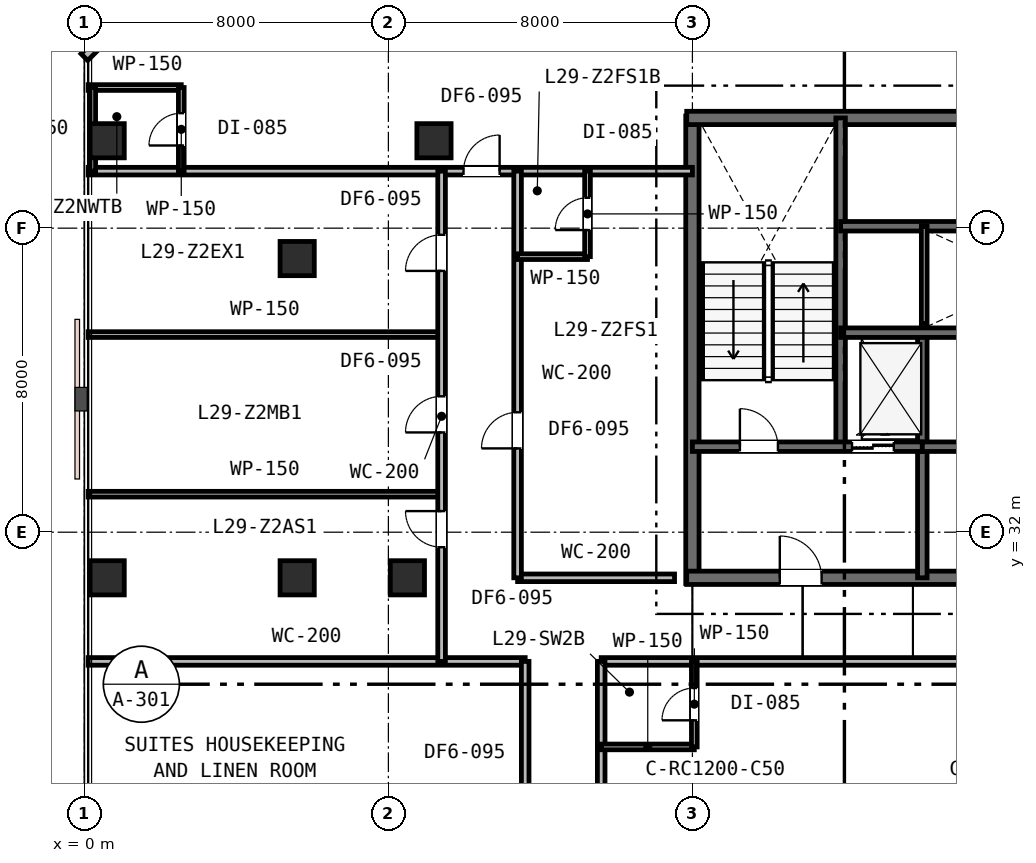
"""IFC4 building model, lengths in metres.
Left out: names, types, materials, properties, quantities, classifications, styles, units other than length and angle.
Written with IfcOpenShell. Run it as: python <this file> out.ifc"""

import sys

from ifc_helpers import new_model, si_unit, direction, frame, frame_2d, origin, origin_2d, place, context, subcontext, project, spatial, rectangle, extrude, element, fill, save


model = new_model("IFC4")
c1 = context("Model", 3, precision=1e-05, world=origin(), true_north=direction((0.0, 1.0)))
c2 = subcontext(c1, "Body", "Model", "MODEL_VIEW")
j1 = project(units=[si_unit("LENGTHUNIT", "METRE"), si_unit("PLANEANGLEUNIT", "RADIAN")], contexts=[c1])
p1 = place(None, origin())
s1 = spatial("IfcSite", under=j1, at=p1, CompositionType="ELEMENT")
p2 = place(p1, origin())
s2 = spatial("IfcBuilding", under=s1, at=p2, CompositionType="ELEMENT")
p3 = place(p2, frame((0.0, 0.0, 115.2)))
s3 = spatial("IfcBuildingStorey", under=s2, at=p3, CompositionType="ELEMENT", Elevation=115.2)
p4 = place(p3, frame((16.0, 30.65, 0.0), z_axis=(0.0, 0.0, 1.0), x_axis=(0.0, 1.0, 0.0)))
e1 = element("IfcWall", 1, at=p4, inside=s3, PredefinedType="SHEAR", context=c2, shape_type="SweptSolid", body=[
    extrude(rectangle(XDim=12.3, YDim=0.35, at=frame_2d((6.15, 0.0))), origin(), (0.0, 0.0, 1.0), 3.6),
])
p5 = place(p3, frame((15.85, 42.9, 0.0), z_axis=(0.0, 0.0, 1.0), x_axis=(1.0, 0.0, 0.0)))
e2 = element("IfcWall", 2, at=p5, inside=s3, PredefinedType="SHEAR", context=c2, shape_type="SweptSolid", body=[
    extrude(rectangle(XDim=24.3, YDim=0.35, at=frame_2d((12.15, 0.0))), origin(), (0.0, 0.0, 1.0), 3.6),
])
p6 = place(p3, frame((15.85, 30.8, 0.0), z_axis=(0.0, 0.0, 1.0), x_axis=(1.0, 0.0, 0.0)))
e3 = element("IfcWall", 3, at=p6, inside=s3, PredefinedType="SHEAR", context=c2, shape_type="SweptSolid", body=[
    extrude(rectangle(XDim=11.2, YDim=0.35, at=frame_2d((5.6, 0.0))), origin(), (0.0, 0.0, 1.0), 3.6),
])
p7 = place(p6, frame((2.45, 0.0, 0.0)))
e4 = element("IfcOpeningElement", 4, at=p7, cuts=e3, PredefinedType="OPENING", context=c2, shape_type="SweptSolid", body=[
    extrude(rectangle(XDim=1.1, YDim=2.15, at=frame_2d((0.55, 1.075))), frame((0.0, 0.185, 0.0), z_axis=(0.0, -1.0, 0.0), x_axis=(1.0, 0.0, 0.0)), (0.0, 0.0, 1.0), 0.37),
])
p8 = place(p3, frame((19.9, 34.25, 0.0), z_axis=(0.0, 0.0, 1.0), x_axis=(0.0, 1.0, 0.0)))
e5 = element("IfcWall", 5, at=p8, inside=s3, PredefinedType="SHEAR", context=c2, shape_type="SweptSolid", body=[
    extrude(rectangle(XDim=8.65, YDim=0.25, at=frame_2d((4.325, 0.0))), origin(), (0.0, 0.0, 1.0), 3.6),
])
p9 = place(p3, frame((22.05, 30.8, 0.0), z_axis=(0.0, 0.0, 1.0), x_axis=(0.0, 1.0, 0.0)))
e6 = element("IfcWall", 6, at=p9, inside=s3, PredefinedType="SHEAR", context=c2, shape_type="SweptSolid", body=[
    extrude(rectangle(XDim=6.45, YDim=0.25, at=frame_2d((3.225, 0.0))), origin(), (0.0, 0.0, 1.0), 3.6),
])
p10 = place(p3, frame((16.0, 34.25, 0.0), z_axis=(0.0, 0.0, 1.0), x_axis=(1.0, 0.0, 0.0)))
e7 = element("IfcWall", 7, at=p10, inside=s3, PredefinedType="SHEAR", context=c2, shape_type="SweptSolid", body=[
    extrude(rectangle(XDim=6.05, YDim=0.25, at=frame_2d((3.025, 0.0))), origin(), (0.0, 0.0, 1.0), 3.6),
])
p11 = place(p10, frame((1.25, 0.0, 0.0)))
e8 = element("IfcOpeningElement", 8, at=p11, cuts=e7, PredefinedType="OPENING", context=c2, shape_type="SweptSolid", body=[
    extrude(rectangle(XDim=1.0, YDim=2.15, at=frame_2d((0.5, 1.075))), frame((0.0, 0.135, 0.0), z_axis=(0.0, -1.0, 0.0), x_axis=(1.0, 0.0, 0.0)), (0.0, 0.0, 1.0), 0.27),
])
p12 = place(p10, frame((4.2, 0.0, 0.0)))
e9 = element("IfcOpeningElement", 9, at=p12, cuts=e7, PredefinedType="OPENING", context=c2, shape_type="SweptSolid", body=[
    extrude(rectangle(XDim=1.1, YDim=2.15, at=frame_2d((0.55, 1.075))), frame((0.0, 0.135, 0.0), z_axis=(0.0, -1.0, 0.0), x_axis=(1.0, 0.0, 0.0)), (0.0, 0.0, 1.0), 0.27),
])
p13 = place(p3, frame((22.05, 34.25, 0.0), z_axis=(0.0, 0.0, 1.0), x_axis=(1.0, 0.0, 0.0)))
e10 = element("IfcWall", 10, at=p13, inside=s3, PredefinedType="SHEAR", context=c2, shape_type="SweptSolid", body=[
    extrude(rectangle(XDim=5.0, YDim=0.25, at=frame_2d((2.5, 0.0))), origin(), (0.0, 0.0, 1.0), 3.6),
])
p14 = place(p13, frame((1.95, 0.0, 0.0)))
e11 = element("IfcOpeningElement", 11, at=p14, cuts=e10, PredefinedType="OPENING", context=c2, shape_type="SweptSolid", body=[
    extrude(rectangle(XDim=1.0, YDim=2.15, at=frame_2d((0.5, 1.075))), frame((0.0, 0.135, 0.0), z_axis=(0.0, -1.0, 0.0), x_axis=(1.0, 0.0, 0.0)), (0.0, 0.0, 1.0), 0.27),
])
p15 = place(p3, frame((19.9, 37.25, 0.0), z_axis=(0.0, 0.0, 1.0), x_axis=(1.0, 0.0, 0.0)))
e12 = element("IfcWall", 12, at=p15, inside=s3, PredefinedType="SHEAR", context=c2, shape_type="SweptSolid", body=[
    extrude(rectangle(XDim=16.2, YDim=0.25, at=frame_2d((8.1, 0.0))), origin(), (0.0, 0.0, 1.0), 3.6),
])
p16 = place(p15, frame((12.55, 0.0, 0.0)))
e13 = element("IfcOpeningElement", 13, at=p16, cuts=e12, PredefinedType="OPENING", context=c2, shape_type="SweptSolid", body=[
    extrude(rectangle(XDim=0.9, YDim=2.15, at=frame_2d((0.45, 1.075))), frame((0.0, 0.135, 0.0), z_axis=(0.0, -1.0, 0.0), x_axis=(1.0, 0.0, 0.0)), (0.0, 0.0, 1.0), 0.27),
])
p17 = place(p3, frame((19.9, 40.05, 0.0), z_axis=(0.0, 0.0, 1.0), x_axis=(1.0, 0.0, 0.0)))
e14 = element("IfcWall", 14, at=p17, inside=s3, PredefinedType="SHEAR", context=c2, shape_type="SweptSolid", body=[
    extrude(rectangle(XDim=12.05, YDim=0.25, at=frame_2d((6.025, 0.0))), origin(), (0.0, 0.0, 1.0), 3.6),
])
for number, where, z_axis, x_axis in (
    (15, (5.6, 30.8, 0.0), (0.0, 0.0, 1.0), (1.0, 0.0, 0.0)),
    (16, (5.6, 39.2, 0.0), (0.0, 0.0, 1.0), (1.0, 0.0, 0.0)),
    (17, (8.5, 30.8, 0.0), (0.0, 0.0, 1.0), (1.0, 0.0, 0.0)),
    (18, (9.2, 42.3, 0.0), (0.0, 0.0, 1.0), (1.0, 0.0, 0.0)),
    (19, (0.6, 30.8, 0.0), (0.0, 0.0, 1.0), (1.0, 0.0, 0.0)),
    (20, (0.6, 42.3, 0.0), (0.0, 0.0, 1.0), (1.0, 0.0, 0.0)),
):
    element("IfcColumn", number, at=place(p3, frame(where, z_axis=z_axis, x_axis=x_axis)), inside=s3, PredefinedType="COLUMN", context=c2, shape_type="SweptSolid", body=[
        extrude(rectangle(XDim=0.9, YDim=0.9, at=origin_2d()), origin(), (0.0, 0.0, 1.0), 3.6),
    ])
p18 = place(p3, frame((3.5, 48.0, 0.0), z_axis=(0.0, 0.0, 1.0), x_axis=(-0.707106781187, -0.707106781187, 0.0)))
e21 = element("IfcWall", 21, at=p18, inside=s3, PredefinedType="STANDARD", context=c2, shape_type="SweptSolid", body=[
    extrude(rectangle(XDim=4.95, YDim=0.25, at=frame_2d((2.475, 0.0))), origin(), (0.0, 0.0, 1.0), 3.33),
])
p19 = place(p18, frame((1.875, 0.0, 0.85)))
e22 = element("IfcOpeningElement", 22, at=p19, cuts=e21, PredefinedType="OPENING", context=c2, shape_type="SweptSolid", body=[
    extrude(rectangle(XDim=1.2, YDim=1.6, at=frame_2d((0.6, 0.8))), frame((0.0, 0.135, 0.0), z_axis=(0.0, -1.0, 0.0), x_axis=(1.0, 0.0, 0.0)), (0.0, 0.0, 1.0), 0.27),
])
p20 = place(p3, frame((22.1, 37.49, 0.0), z_axis=(0.0, 0.0, 1.0), x_axis=(0.0, 1.0, 0.0)))
e23 = element("IfcWall", 23, at=p20, inside=s3, PredefinedType="PLUMBINGWALL", context=c2, shape_type="SweptSolid", body=[
    extrude(rectangle(XDim=2.56, YDim=0.15, at=frame_2d((1.28, 0.0))), origin(), (0.0, 0.0, 1.0), 3.33),
])
p21 = place(p3, frame((0.1, 28.6, 0.0), z_axis=(0.0, 0.0, 1.0), x_axis=(1.0, 0.0, 0.0)))
e24 = element("IfcWall", 24, at=p21, inside=s3, PredefinedType="PARTITIONING", context=c2, shape_type="SweptSolid", body=[
    extrude(rectangle(XDim=11.5, YDim=0.2, at=frame_2d((5.75, 0.0))), origin(), (0.0, 0.0, 1.0), 2.87),
])
p22 = place(p3, frame((13.6, 28.6, 0.0), z_axis=(0.0, 0.0, 1.0), x_axis=(1.0, 0.0, 0.0)))
e25 = element("IfcWall", 25, at=p22, inside=s3, PredefinedType="PARTITIONING", context=c2, shape_type="SweptSolid", body=[
    extrude(rectangle(XDim=30.6, YDim=0.2, at=frame_2d((15.3, 0.0))), origin(), (0.0, 0.0, 1.0), 2.87),
])
p23 = place(p22, frame((13.325, 0.0, 0.0)))
e26 = element("IfcOpeningElement", 26, at=p23, cuts=e25, PredefinedType="OPENING", context=c2, shape_type="SweptSolid", body=[
    extrude(rectangle(XDim=0.95, YDim=2.15, at=frame_2d((0.475, 1.075))), frame((0.0, 0.11, 0.0), z_axis=(0.0, -1.0, 0.0), x_axis=(1.0, 0.0, 0.0)), (0.0, 0.0, 1.0), 0.22),
])
p24 = place(p22, frame((18.761, 0.0, 0.0)))
e27 = element("IfcOpeningElement", 27, at=p24, cuts=e25, PredefinedType="OPENING", context=c2, shape_type="SweptSolid", body=[
    extrude(rectangle(XDim=0.95, YDim=2.15, at=frame_2d((0.475, 1.075))), frame((0.0, 0.11, 0.0), z_axis=(0.0, -1.0, 0.0), x_axis=(1.0, 0.0, 0.0)), (0.0, 0.0, 1.0), 0.22),
])
p25 = place(p22, frame((25.503, 0.0, 0.0)))
e28 = element("IfcOpeningElement", 28, at=p25, cuts=e25, PredefinedType="OPENING", context=c2, shape_type="SweptSolid", body=[
    extrude(rectangle(XDim=0.95, YDim=2.15, at=frame_2d((0.475, 1.075))), frame((0.0, 0.11, 0.0), z_axis=(0.0, -1.0, 0.0), x_axis=(1.0, 0.0, 0.0)), (0.0, 0.0, 1.0), 0.22),
])
p26 = place(p3, frame((11.4, 30.8, 0.0), z_axis=(0.0, 0.0, 1.0), x_axis=(1.0, 0.0, 0.0)))
e29 = element("IfcWall", 29, at=p26, inside=s3, PredefinedType="PARTITIONING", context=c2, shape_type="SweptSolid", body=[
    extrude(rectangle(XDim=4.13, YDim=0.2, at=frame_2d((2.065, 0.0))), origin(), (0.0, 0.0, 1.0), 2.87),
])
p27 = place(p3, frame((11.6, 10.6, 0.0), z_axis=(0.0, 0.0, 1.0), x_axis=(0.0, 1.0, 0.0)))
e30 = element("IfcWall", 30, at=p27, inside=s3, PredefinedType="PARTITIONING", context=c2, shape_type="SweptSolid", body=[
    extrude(rectangle(XDim=18.0, YDim=0.2, at=frame_2d((9.0, 0.0))), origin(), (0.0, 0.0, 1.0), 2.87),
])
p28 = place(p27, frame((8.425, 0.0, 0.0)))
e31 = element("IfcOpeningElement", 31, at=p28, cuts=e30, PredefinedType="OPENING", context=c2, shape_type="SweptSolid", body=[
    extrude(rectangle(XDim=0.95, YDim=2.15, at=frame_2d((0.475, 1.075))), frame((0.0, 0.11, 0.0), z_axis=(0.0, -1.0, 0.0), x_axis=(1.0, 0.0, 0.0)), (0.0, 0.0, 1.0), 0.22),
])
p29 = place(p27, frame((13.725, 0.0, 0.0)))
e32 = element("IfcOpeningElement", 32, at=p29, cuts=e30, PredefinedType="OPENING", context=c2, shape_type="SweptSolid", body=[
    extrude(rectangle(XDim=0.95, YDim=2.15, at=frame_2d((0.475, 1.075))), frame((0.0, 0.11, 0.0), z_axis=(0.0, -1.0, 0.0), x_axis=(1.0, 0.0, 0.0)), (0.0, 0.0, 1.0), 0.22),
])
p30 = place(p27, frame((3.225, 0.0, 0.0)))
e33 = element("IfcOpeningElement", 33, at=p30, cuts=e30, PredefinedType="OPENING", context=c2, shape_type="SweptSolid", body=[
    extrude(rectangle(XDim=0.95, YDim=2.15, at=frame_2d((0.475, 1.075))), frame((0.0, 0.11, 0.0), z_axis=(0.0, -1.0, 0.0), x_axis=(1.0, 0.0, 0.0)), (0.0, 0.0, 1.0), 0.22),
])
p31 = place(p3, frame((0.1, 41.5, 0.0), z_axis=(0.0, 0.0, 1.0), x_axis=(1.0, 0.0, 0.0)))
e34 = element("IfcWall", 34, at=p31, inside=s3, PredefinedType="PARTITIONING", context=c2, shape_type="SweptSolid", body=[
    extrude(rectangle(XDim=15.9, YDim=0.2, at=frame_2d((7.95, 0.0))), origin(), (0.0, 0.0, 1.0), 2.87),
])
p32 = place(p31, frame((9.877, 0.0, 0.0)))
e35 = element("IfcOpeningElement", 35, at=p32, cuts=e34, PredefinedType="OPENING", context=c2, shape_type="SweptSolid", body=[
    extrude(rectangle(XDim=0.95, YDim=2.15, at=frame_2d((0.475, 1.075))), frame((0.0, 0.11, 0.0), z_axis=(0.0, -1.0, 0.0), x_axis=(1.0, 0.0, 0.0)), (0.0, 0.0, 1.0), 0.22),
])
p33 = place(p3, frame((0.1, 43.7, 0.0), z_axis=(0.0, 0.0, 1.0), x_axis=(1.0, 0.0, 0.0)))
e36 = element("IfcWall", 36, at=p33, inside=s3, PredefinedType="PARTITIONING", context=c2, shape_type="SweptSolid", body=[
    extrude(rectangle(XDim=2.45, YDim=0.15, at=frame_2d((1.225, 0.0))), origin(), (0.0, 0.0, 1.0), 3.33),
])
p34 = place(p3, frame((2.55, 41.5, 0.0), z_axis=(0.0, 0.0, 1.0), x_axis=(0.0, 1.0, 0.0)))
e37 = element("IfcWall", 37, at=p34, inside=s3, PredefinedType="PARTITIONING", context=c2, shape_type="SweptSolid", body=[
    extrude(rectangle(XDim=2.2, YDim=0.15, at=frame_2d((1.1, 0.0))), origin(), (0.0, 0.0, 1.0), 2.87),
])
p35 = place(p34, frame((0.675, 0.0, 0.0)))
e38 = element("IfcOpeningElement", 38, at=p35, cuts=e37, PredefinedType="OPENING", context=c2, shape_type="SweptSolid", body=[
    extrude(rectangle(XDim=0.85, YDim=2.15, at=frame_2d((0.425, 1.075))), frame((0.0, 0.085, 0.0), z_axis=(0.0, -1.0, 0.0), x_axis=(1.0, 0.0, 0.0)), (0.0, 0.0, 1.0), 0.17),
])
p36 = place(p3, frame((0.22, 41.5, 0.0), z_axis=(0.0, 0.0, 1.0), x_axis=(0.0, 1.0, 0.0)))
e39 = element("IfcWall", 39, at=p36, inside=s3, PredefinedType="PARTITIONING", context=c2, shape_type="SweptSolid", body=[
    extrude(rectangle(XDim=2.2, YDim=0.15, at=frame_2d((1.1, 0.0))), origin(), (0.0, 0.0, 1.0), 2.87),
])
for number, where, z_axis, x_axis in (
    (40, (0.1, 33.0, 0.0), (0.0, 0.0, 1.0), (1.0, 0.0, 0.0)),
    (41, (0.1, 37.2, 0.0), (0.0, 0.0, 1.0), (1.0, 0.0, 0.0)),
):
    element("IfcWall", number, at=place(p3, frame(where, z_axis=z_axis, x_axis=x_axis)), inside=s3, PredefinedType="PARTITIONING", context=c2, shape_type="SweptSolid", body=[
        extrude(rectangle(XDim=9.3, YDim=0.15, at=frame_2d((4.65, 0.0))), origin(), (0.0, 0.0, 1.0), 2.87),
    ])
p37 = place(p3, frame((9.4, 28.6, 0.0), z_axis=(0.0, 0.0, 1.0), x_axis=(0.0, 1.0, 0.0)))
e42 = element("IfcWall", 42, at=p37, inside=s3, PredefinedType="PARTITIONING", context=c2, shape_type="SweptSolid", body=[
    extrude(rectangle(XDim=12.9, YDim=0.2, at=frame_2d((6.45, 0.0))), origin(), (0.0, 0.0, 1.0), 2.87),
])
p38 = place(p37, frame((3.005, 0.0, 0.0)))
e43 = element("IfcOpeningElement", 43, at=p38, cuts=e42, PredefinedType="OPENING", context=c2, shape_type="SweptSolid", body=[
    extrude(rectangle(XDim=0.95, YDim=2.15, at=frame_2d((0.475, 1.075))), frame((0.0, 0.11, 0.0), z_axis=(0.0, -1.0, 0.0), x_axis=(1.0, 0.0, 0.0)), (0.0, 0.0, 1.0), 0.22),
])
p39 = place(p37, frame((6.025, 0.0, 0.0)))
e44 = element("IfcOpeningElement", 44, at=p39, cuts=e42, PredefinedType="OPENING", context=c2, shape_type="SweptSolid", body=[
    extrude(rectangle(XDim=0.95, YDim=2.15, at=frame_2d((0.475, 1.075))), frame((0.0, 0.11, 0.0), z_axis=(0.0, -1.0, 0.0), x_axis=(1.0, 0.0, 0.0)), (0.0, 0.0, 1.0), 0.22),
])
p40 = place(p37, frame((10.275, 0.0, 0.0)))
e45 = element("IfcOpeningElement", 45, at=p40, cuts=e42, PredefinedType="OPENING", context=c2, shape_type="SweptSolid", body=[
    extrude(rectangle(XDim=0.95, YDim=2.15, at=frame_2d((0.475, 1.075))), frame((0.0, 0.11, 0.0), z_axis=(0.0, -1.0, 0.0), x_axis=(1.0, 0.0, 0.0)), (0.0, 0.0, 1.0), 0.22),
])
p41 = place(p3, frame((11.4, 30.8, 0.0), z_axis=(0.0, 0.0, 1.0), x_axis=(0.0, 1.0, 0.0)))
e46 = element("IfcWall", 46, at=p41, inside=s3, PredefinedType="PARTITIONING", context=c2, shape_type="SweptSolid", body=[
    extrude(rectangle(XDim=10.7, YDim=0.2, at=frame_2d((5.35, 0.0))), origin(), (0.0, 0.0, 1.0), 2.87),
])
p42 = place(p41, frame((3.405, 0.0, 0.0)))
e47 = element("IfcOpeningElement", 47, at=p42, cuts=e46, PredefinedType="OPENING", context=c2, shape_type="SweptSolid", body=[
    extrude(rectangle(XDim=0.95, YDim=2.15, at=frame_2d((0.475, 1.075))), frame((0.0, 0.11, 0.0), z_axis=(0.0, -1.0, 0.0), x_axis=(1.0, 0.0, 0.0)), (0.0, 0.0, 1.0), 0.22),
])
p43 = place(p3, frame((11.4, 39.25, 0.0), z_axis=(0.0, 0.0, 1.0), x_axis=(1.0, 0.0, 0.0)))
e48 = element("IfcWall", 48, at=p43, inside=s3, PredefinedType="PARTITIONING", context=c2, shape_type="SweptSolid", body=[
    extrude(rectangle(XDim=1.84, YDim=0.15, at=frame_2d((0.92, 0.0))), origin(), (0.0, 0.0, 1.0), 3.33),
])
p44 = place(p3, frame((13.24, 39.25, 0.0), z_axis=(0.0, 0.0, 1.0), x_axis=(0.0, 1.0, 0.0)))
e49 = element("IfcWall", 49, at=p44, inside=s3, PredefinedType="PARTITIONING", context=c2, shape_type="SweptSolid", body=[
    extrude(rectangle(XDim=2.25, YDim=0.15, at=frame_2d((1.125, 0.0))), origin(), (0.0, 0.0, 1.0), 3.33),
])
p45 = place(p44, frame((0.7, 0.0, 0.0)))
e50 = element("IfcOpeningElement", 50, at=p45, cuts=e49, PredefinedType="OPENING", context=c2, shape_type="SweptSolid", body=[
    extrude(rectangle(XDim=0.85, YDim=2.15, at=frame_2d((0.425, 1.075))), frame((0.0, 0.085, 0.0), z_axis=(0.0, -1.0, 0.0), x_axis=(1.0, 0.0, 0.0)), (0.0, 0.0, 1.0), 0.17),
])
p46 = place(p3, frame((13.6, 10.6, 0.0), z_axis=(0.0, 0.0, 1.0), x_axis=(0.0, 1.0, 0.0)))
e51 = element("IfcWall", 51, at=p46, inside=s3, PredefinedType="PARTITIONING", context=c2, shape_type="SweptSolid", body=[
    extrude(rectangle(XDim=18.0, YDim=0.2, at=frame_2d((9.0, 0.0))), origin(), (0.0, 0.0, 1.0), 2.87),
])
p47 = place(p46, frame((4.24, 0.0, 0.0)))
e52 = element("IfcOpeningElement", 52, at=p47, cuts=e51, PredefinedType="OPENING", context=c2, shape_type="SweptSolid", body=[
    extrude(rectangle(XDim=0.95, YDim=2.15, at=frame_2d((0.475, 1.075))), frame((0.0, 0.11, 0.0), z_axis=(0.0, -1.0, 0.0), x_axis=(1.0, 0.0, 0.0)), (0.0, 0.0, 1.0), 0.22),
])
p48 = place(p46, frame((11.494, 0.0, 0.0)))
e53 = element("IfcOpeningElement", 53, at=p48, cuts=e51, PredefinedType="OPENING", context=c2, shape_type="SweptSolid", body=[
    extrude(rectangle(XDim=0.95, YDim=2.15, at=frame_2d((0.475, 1.075))), frame((0.0, 0.11, 0.0), z_axis=(0.0, -1.0, 0.0), x_axis=(1.0, 0.0, 0.0)), (0.0, 0.0, 1.0), 0.22),
])
p49 = place(p3, frame((13.6, 26.35, 0.0), z_axis=(0.0, 0.0, 1.0), x_axis=(1.0, 0.0, 0.0)))
e54 = element("IfcWall", 54, at=p49, inside=s3, PredefinedType="PARTITIONING", context=c2, shape_type="SweptSolid", body=[
    extrude(rectangle(XDim=2.45, YDim=0.15, at=frame_2d((1.225, 0.0))), origin(), (0.0, 0.0, 1.0), 2.87),
])
p50 = place(p3, frame((16.05, 26.35, 0.0), z_axis=(0.0, 0.0, 1.0), x_axis=(0.0, 1.0, 0.0)))
e55 = element("IfcWall", 55, at=p50, inside=s3, PredefinedType="PARTITIONING", context=c2, shape_type="SweptSolid", body=[
    extrude(rectangle(XDim=2.25, YDim=0.15, at=frame_2d((1.125, 0.0))), origin(), (0.0, 0.0, 1.0), 2.87),
])
p51 = place(p50, frame((0.7, 0.0, 0.0)))
e56 = element("IfcOpeningElement", 56, at=p51, cuts=e55, PredefinedType="OPENING", context=c2, shape_type="SweptSolid", body=[
    extrude(rectangle(XDim=0.85, YDim=2.15, at=frame_2d((0.425, 1.075))), frame((0.0, 0.085, 0.0), z_axis=(0.0, -1.0, 0.0), x_axis=(1.0, 0.0, 0.0)), (0.0, 0.0, 1.0), 0.17),
])
p52 = place(p11, origin())
e57 = element("IfcDoor", 57, at=p52, inside=s3, OperationType="SINGLE_SWING_LEFT", PredefinedType="DOOR", context=c2, shape_type="SweptSolid", body=[
    extrude(rectangle(XDim=1.0, YDim=2.15, at=frame_2d((0.5, 1.075))), frame((0.0, 0.025, 0.0), z_axis=(0.0, -1.0, 0.0), x_axis=(1.0, 0.0, 0.0)), (0.0, 0.0, 1.0), 0.05),
])
fill(e8, e57)
p53 = place(p7, origin())
e58 = element("IfcDoor", 58, at=p53, inside=s3, OperationType="SINGLE_SWING_LEFT", PredefinedType="DOOR", context=c2, shape_type="SweptSolid", body=[
    extrude(rectangle(XDim=1.1, YDim=2.15, at=frame_2d((0.55, 1.075))), frame((0.0, 0.025, 0.0), z_axis=(0.0, -1.0, 0.0), x_axis=(1.0, 0.0, 0.0)), (0.0, 0.0, 1.0), 0.05),
])
fill(e4, e58)
p54 = place(p32, origin())
e59 = element("IfcDoor", 59, at=p54, inside=s3, OperationType="SINGLE_SWING_RIGHT", PredefinedType="DOOR", context=c2, shape_type="SweptSolid", body=[
    extrude(rectangle(XDim=0.95, YDim=2.15, at=frame_2d((0.475, 1.075))), frame((0.0, 0.025, 0.0), z_axis=(0.0, -1.0, 0.0), x_axis=(1.0, 0.0, 0.0)), (0.0, 0.0, 1.0), 0.05),
])
fill(e35, e59)
p55 = place(p35, origin())
e60 = element("IfcDoor", 60, at=p55, inside=s3, OperationType="SINGLE_SWING_LEFT", PredefinedType="DOOR", context=c2, shape_type="SweptSolid", body=[
    extrude(rectangle(XDim=0.85, YDim=2.15, at=frame_2d((0.425, 1.075))), frame((0.0, 0.025, 0.0), z_axis=(0.0, -1.0, 0.0), x_axis=(1.0, 0.0, 0.0)), (0.0, 0.0, 1.0), 0.05),
])
fill(e38, e60)
p56 = place(p38, origin())
e61 = element("IfcDoor", 61, at=p56, inside=s3, OperationType="SINGLE_SWING_RIGHT", PredefinedType="DOOR", context=c2, shape_type="SweptSolid", body=[
    extrude(rectangle(XDim=0.95, YDim=2.15, at=frame_2d((0.475, 1.075))), frame((0.0, 0.025, 0.0), z_axis=(0.0, -1.0, 0.0), x_axis=(1.0, 0.0, 0.0)), (0.0, 0.0, 1.0), 0.05),
])
fill(e43, e61)
p57 = place(p39, origin())
e62 = element("IfcDoor", 62, at=p57, inside=s3, OperationType="SINGLE_SWING_LEFT", PredefinedType="DOOR", context=c2, shape_type="SweptSolid", body=[
    extrude(rectangle(XDim=0.95, YDim=2.15, at=frame_2d((0.475, 1.075))), frame((0.0, 0.025, 0.0), z_axis=(0.0, -1.0, 0.0), x_axis=(1.0, 0.0, 0.0)), (0.0, 0.0, 1.0), 0.05),
])
fill(e44, e62)
p58 = place(p40, origin())
e63 = element("IfcDoor", 63, at=p58, inside=s3, OperationType="SINGLE_SWING_LEFT", PredefinedType="DOOR", context=c2, shape_type="SweptSolid", body=[
    extrude(rectangle(XDim=0.95, YDim=2.15, at=frame_2d((0.475, 1.075))), frame((0.0, 0.025, 0.0), z_axis=(0.0, -1.0, 0.0), x_axis=(1.0, 0.0, 0.0)), (0.0, 0.0, 1.0), 0.05),
])
fill(e45, e63)
p59 = place(p42, origin())
e64 = element("IfcDoor", 64, at=p59, inside=s3, OperationType="SINGLE_SWING_LEFT", PredefinedType="DOOR", context=c2, shape_type="SweptSolid", body=[
    extrude(rectangle(XDim=0.95, YDim=2.15, at=frame_2d((0.475, 1.075))), frame((0.0, 0.025, 0.0), z_axis=(0.0, -1.0, 0.0), x_axis=(1.0, 0.0, 0.0)), (0.0, 0.0, 1.0), 0.05),
])
fill(e47, e64)
p60 = place(p45, origin())
e65 = element("IfcDoor", 65, at=p60, inside=s3, OperationType="SINGLE_SWING_LEFT", PredefinedType="DOOR", context=c2, shape_type="SweptSolid", body=[
    extrude(rectangle(XDim=0.85, YDim=2.15, at=frame_2d((0.425, 1.075))), frame((0.0, 0.025, 0.0), z_axis=(0.0, -1.0, 0.0), x_axis=(1.0, 0.0, 0.0)), (0.0, 0.0, 1.0), 0.05),
])
fill(e50, e65)
p61 = place(p51, origin())
e66 = element("IfcDoor", 66, at=p61, inside=s3, OperationType="SINGLE_SWING_LEFT", PredefinedType="DOOR", context=c2, shape_type="SweptSolid", body=[
    extrude(rectangle(XDim=0.85, YDim=2.15, at=frame_2d((0.425, 1.075))), frame((0.0, 0.025, 0.0), z_axis=(0.0, -1.0, 0.0), x_axis=(1.0, 0.0, 0.0)), (0.0, 0.0, 1.0), 0.05),
])
fill(e56, e66)
p62 = place(p12, origin())
e67 = element("IfcDoor", 67, at=p62, inside=s3, OperationType="DOUBLE_DOOR_SLIDING", PredefinedType="DOOR", context=c2, shape_type="SweptSolid", body=[
    extrude(rectangle(XDim=1.1, YDim=2.15, at=frame_2d((0.55, 1.075))), frame((0.0, 0.025, 0.0), z_axis=(0.0, -1.0, 0.0), x_axis=(1.0, 0.0, 0.0)), (0.0, 0.0, 1.0), 0.05),
])
fill(e9, e67)
save(model, sys.argv[1])
